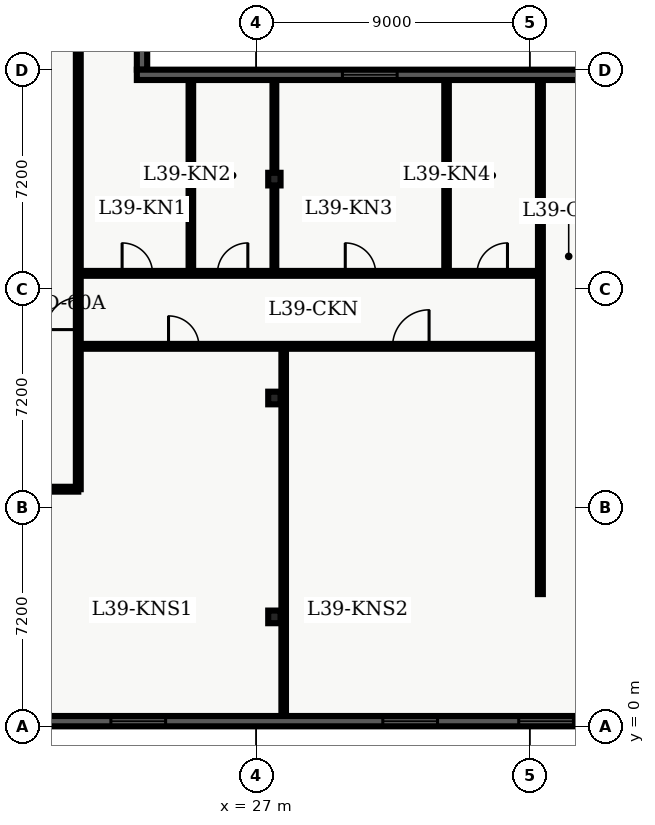
"""IFC4 building model, lengths in metres.
Left out: names, types, materials, properties, quantities, classifications, styles, units other than length and angle.
Written with IfcOpenShell. Run it as: python <this file> out.ifc"""

import sys

from ifc_helpers import new_model, entity, si_unit, converted_unit, direction, frame, origin_with_axes, origin_2d_with_axis, place, context, subcontext, project, spatial, polyline, rectangle, i_section, outline, extrude, element, fill, save


model = new_model("IFC4")
c1 = context("Model", 3, precision=1e-05, world=origin_with_axes(), true_north=direction((0.0, 1.0)))
c2 = subcontext(c1, "Body", "Model", "MODEL_VIEW")
j1 = project(units=[si_unit("LENGTHUNIT", "METRE"), converted_unit("PLANEANGLEUNIT", "DEGREE", entity("IfcPlaneAngleMeasure", 0.017), si_unit("PLANEANGLEUNIT", "RADIAN"), dimensions=[0, 0, 0, 0, 0, 0, 0])], contexts=[c1])
p1 = place(None, origin_with_axes())
s1 = spatial("IfcSite", under=j1, at=p1, CompositionType="ELEMENT")
p2 = place(p1, origin_with_axes())
s2 = spatial("IfcBuilding", under=s1, at=p2, CompositionType="ELEMENT")
p3 = place(p2, frame((0.0, 0.0, 160.2), z_axis=(0.0, 0.0, 1.0), x_axis=(1.0, 0.0, 0.0)))
s3 = spatial("IfcBuildingStorey", under=s2, at=p3, CompositionType="ELEMENT", Elevation=160.2)
for number, where, z_axis, x_axis in (
    (1, (27.6, 3.6, 0.0), (0.0, 0.0, 1.0), (1.0, 0.0, 0.0)),
    (2, (27.6, 10.8, 0.0), (0.0, 0.0, 1.0), (1.0, 0.0, 0.0)),
    (3, (27.6, 18.0, 0.0), (0.0, 0.0, 1.0), (1.0, 0.0, 0.0)),
):
    element("IfcColumn", number, at=place(p3, frame(where, z_axis=z_axis, x_axis=x_axis)), inside=s3, PredefinedType="COLUMN", context=c2, shape_type="SweptSolid", body=[
        extrude(i_section(OverallWidth=0.406, OverallDepth=0.416, WebThickness=0.03, FlangeThickness=0.048, FilletRadius=0.022, at=origin_2d_with_axis()), origin_with_axes(), (0.0, 0.0, 1.0), 3.9),
    ])
p4 = place(p3, frame((2.6, 7.8, 0.0), z_axis=(0.0, 0.0, 1.0), x_axis=(1.0, 0.0, 0.0)))
e4 = element("IfcWall", 4, at=p4, inside=s3, PredefinedType="PARTITIONING", context=c2, shape_type="SweptSolid", body=[
    extrude(outline(polyline([(0.0, -0.08), (18.55, -0.08), (18.55, 0.08), (0.0, 0.08), (0.0, -0.08)])), origin_with_axes(), (0.0, 0.0, 1.0), 2.7),
])
p5 = place(p4, frame((2.551, 0.0, 0.0), z_axis=(0.0, 0.0, 1.0), x_axis=(1.0, 0.0, 0.0)))
e5 = element("IfcOpeningElement", 5, at=p5, cuts=e4, PredefinedType="OPENING", context=c2, shape_type="SweptSolid", body=[
    extrude(rectangle(XDim=1.0, YDim=0.18, at=origin_2d_with_axis()), origin_with_axes(), (0.0, 0.0, 1.0), 2.15),
])
p6 = place(p4, frame((8.065, 0.0, 0.0), z_axis=(0.0, 0.0, 1.0), x_axis=(1.0, 0.0, 0.0)))
e6 = element("IfcOpeningElement", 6, at=p6, cuts=e4, PredefinedType="OPENING", context=c2, shape_type="SweptSolid", body=[
    extrude(rectangle(XDim=1.0, YDim=0.18, at=origin_2d_with_axis()), origin_with_axes(), (0.0, 0.0, 1.0), 2.15),
])
p7 = place(p4, frame((14.758, 0.0, 0.0), z_axis=(0.0, 0.0, 1.0), x_axis=(1.0, 0.0, 0.0)))
e7 = element("IfcOpeningElement", 7, at=p7, cuts=e4, PredefinedType="OPENING", context=c2, shape_type="SweptSolid", body=[
    extrude(rectangle(XDim=1.0, YDim=0.18, at=origin_2d_with_axis()), origin_with_axes(), (0.0, 0.0, 1.0), 2.15),
])
p8 = place(p3, frame((21.15, 7.8, 0.0), z_axis=(0.0, 0.0, 1.0), x_axis=(0.0, 1.0, 0.0)))
e8 = element("IfcWall", 8, at=p8, inside=s3, PredefinedType="PARTITIONING", context=c2, shape_type="SweptSolid", body=[
    extrude(outline(polyline([(0.0, -0.08), (32.7, -0.08), (32.7, 0.08), (0.0, 0.08), (0.0, -0.08)])), origin_with_axes(), (0.0, 0.0, 1.0), 2.7),
])
p9 = place(p8, frame((5.775, 0.0, 0.0), z_axis=(0.0, 0.0, 1.0), x_axis=(1.0, 0.0, 0.0)))
e9 = element("IfcOpeningElement", 9, at=p9, cuts=e8, PredefinedType="OPENING", context=c2, shape_type="SweptSolid", body=[
    extrude(rectangle(XDim=1.05, YDim=0.18, at=origin_2d_with_axis()), origin_with_axes(), (0.0, 0.0, 1.0), 2.15),
])
p10 = place(p3, frame((21.15, 12.5, 0.0), z_axis=(0.0, 0.0, 1.0), x_axis=(1.0, 0.0, 0.0)))
e10 = element("IfcWall", 10, at=p10, inside=s3, PredefinedType="PARTITIONING", context=c2, shape_type="SweptSolid", body=[
    extrude(outline(polyline([(0.0, -0.08), (15.2, -0.08), (15.2, 0.08), (0.0, 0.08), (0.0, -0.08)])), origin_with_axes(), (0.0, 0.0, 1.0), 2.7),
])
p11 = place(p10, frame((3.468, 0.0, 0.0), z_axis=(0.0, 0.0, 1.0), x_axis=(1.0, 0.0, 0.0)))
e11 = element("IfcOpeningElement", 11, at=p11, cuts=e10, PredefinedType="OPENING", context=c2, shape_type="SweptSolid", body=[
    extrude(rectangle(XDim=1.0, YDim=0.18, at=origin_2d_with_axis()), origin_with_axes(), (0.0, 0.0, 1.0), 2.15),
])
p12 = place(p10, frame((10.938, 0.0, 0.0), z_axis=(0.0, 0.0, 1.0), x_axis=(1.0, 0.0, 0.0)))
e12 = element("IfcOpeningElement", 12, at=p12, cuts=e10, PredefinedType="OPENING", context=c2, shape_type="SweptSolid", body=[
    extrude(rectangle(XDim=1.2, YDim=0.18, at=origin_2d_with_axis()), origin_with_axes(), (0.0, 0.0, 1.0), 2.2),
])
p13 = place(p3, frame((21.15, 14.9, 0.0), z_axis=(0.0, 0.0, 1.0), x_axis=(1.0, 0.0, 0.0)))
e13 = element("IfcWall", 13, at=p13, inside=s3, PredefinedType="PARTITIONING", context=c2, shape_type="SweptSolid", body=[
    extrude(outline(polyline([(0.0, -0.08), (15.2, -0.08), (15.2, 0.08), (0.0, 0.08), (0.0, -0.08)])), origin_with_axes(), (0.0, 0.0, 1.0), 2.7),
])
p14 = place(p13, frame((1.942, 0.0, 0.0), z_axis=(0.0, 0.0, 1.0), x_axis=(1.0, 0.0, 0.0)))
e14 = element("IfcOpeningElement", 14, at=p14, cuts=e13, PredefinedType="OPENING", context=c2, shape_type="SweptSolid", body=[
    extrude(rectangle(XDim=1.0, YDim=0.18, at=origin_2d_with_axis()), origin_with_axes(), (0.0, 0.0, 1.0), 2.15),
])
p15 = place(p13, frame((5.077, 0.0, 0.0), z_axis=(0.0, 0.0, 1.0), x_axis=(1.0, 0.0, 0.0)))
e15 = element("IfcOpeningElement", 15, at=p15, cuts=e13, PredefinedType="OPENING", context=c2, shape_type="SweptSolid", body=[
    extrude(rectangle(XDim=1.0, YDim=0.18, at=origin_2d_with_axis()), origin_with_axes(), (0.0, 0.0, 1.0), 2.15),
])
p16 = place(p13, frame((9.281, 0.0, 0.0), z_axis=(0.0, 0.0, 1.0), x_axis=(1.0, 0.0, 0.0)))
e16 = element("IfcOpeningElement", 16, at=p16, cuts=e13, PredefinedType="OPENING", context=c2, shape_type="SweptSolid", body=[
    extrude(rectangle(XDim=1.0, YDim=0.18, at=origin_2d_with_axis()), origin_with_axes(), (0.0, 0.0, 1.0), 2.15),
])
p17 = place(p13, frame((13.617, 0.0, 0.0), z_axis=(0.0, 0.0, 1.0), x_axis=(1.0, 0.0, 0.0)))
e17 = element("IfcOpeningElement", 17, at=p17, cuts=e13, PredefinedType="OPENING", context=c2, shape_type="SweptSolid", body=[
    extrude(rectangle(XDim=1.0, YDim=0.18, at=origin_2d_with_axis()), origin_with_axes(), (0.0, 0.0, 1.0), 2.15),
])
p18 = place(p3, frame((36.35, 4.35, 0.0), z_axis=(0.0, 0.0, 1.0), x_axis=(0.0, 1.0, 0.0)))
e18 = element("IfcWall", 18, at=p18, inside=s3, PredefinedType="PARTITIONING", context=c2, shape_type="SweptSolid", body=[
    extrude(outline(polyline([(0.0, -0.08), (16.95, -0.08), (16.95, 0.08), (0.0, 0.08), (0.0, -0.08)])), origin_with_axes(), (0.0, 0.0, 1.0), 2.7),
])
p19 = place(p3, frame((27.906, 0.335, 0.0), z_axis=(0.0, 0.0, 1.0), x_axis=(0.0, 1.0, 0.0)))
e19 = element("IfcWall", 19, at=p19, inside=s3, PredefinedType="PARTITIONING", context=c2, shape_type="SweptSolid", body=[
    extrude(outline(polyline([(0.0, -0.075), (12.045, -0.075), (12.045, 0.075), (0.0, 0.075), (0.0, -0.075)])), origin_with_axes(), (0.0, 0.0, 1.0), 2.7),
])
p20 = place(p3, frame((24.853, 15.02, 0.0), z_axis=(0.0, 0.0, 1.0), x_axis=(0.0, 1.0, 0.0)))
e20 = element("IfcWall", 20, at=p20, inside=s3, PredefinedType="PARTITIONING", context=c2, shape_type="SweptSolid", body=[
    extrude(outline(polyline([(0.0, -0.075), (6.245, -0.075), (6.245, 0.075), (0.0, 0.075), (0.0, -0.075)])), origin_with_axes(), (0.0, 0.0, 1.0), 2.7),
])
p21 = place(p3, frame((27.6, 15.02, 0.0), z_axis=(0.0, 0.0, 1.0), x_axis=(0.0, 1.0, 0.0)))
e21 = element("IfcWall", 21, at=p21, inside=s3, PredefinedType="PARTITIONING", context=c2, shape_type="SweptSolid", body=[
    extrude(outline(polyline([(0.0, -0.062), (6.245, -0.062), (6.245, 0.062), (0.0, 0.062), (0.0, -0.062)])), origin_with_axes(), (0.0, 0.0, 1.0), 2.7),
])
p22 = place(p3, frame((33.263, 15.02, 0.0), z_axis=(0.0, 0.0, 1.0), x_axis=(0.0, 1.0, 0.0)))
e22 = element("IfcWall", 22, at=p22, inside=s3, PredefinedType="PARTITIONING", context=c2, shape_type="SweptSolid", body=[
    extrude(outline(polyline([(0.0, -0.075), (6.245, -0.075), (6.245, 0.075), (0.0, 0.075), (0.0, -0.075)])), origin_with_axes(), (0.0, 0.0, 1.0), 2.7),
])
p23 = place(p3, frame((57.26, 0.17, 0.0), z_axis=(0.0, 0.0, 1.0), x_axis=(-1.0, 0.0, 0.0)))
e23 = element("IfcWall", 23, at=p23, inside=s3, PredefinedType="SOLIDWALL", context=c2, shape_type="SweptSolid", body=[
    extrude(outline(polyline([(0.0, -0.17), (54.86, -0.17), (54.86, 0.17), (0.0, 0.17), (0.0, -0.17)])), origin_with_axes(), (0.0, 0.0, 1.0), 3.66),
])
p24 = place(p23, frame((2.836, 0.0, 0.45), z_axis=(0.0, 0.0, 1.0), x_axis=(1.0, 0.0, 0.0)))
e24 = element("IfcOpeningElement", 24, at=p24, cuts=e23, PredefinedType="OPENING", context=c2, shape_type="SweptSolid", body=[
    extrude(rectangle(XDim=1.8, YDim=0.36, at=origin_2d_with_axis()), origin_with_axes(), (0.0, 0.0, 1.0), 2.1),
])
p25 = place(p23, frame((7.307, 0.0, 0.45), z_axis=(0.0, 0.0, 1.0), x_axis=(1.0, 0.0, 0.0)))
e25 = element("IfcOpeningElement", 25, at=p25, cuts=e23, PredefinedType="OPENING", context=c2, shape_type="SweptSolid", body=[
    extrude(rectangle(XDim=1.8, YDim=0.36, at=origin_2d_with_axis()), origin_with_axes(), (0.0, 0.0, 1.0), 2.1),
])
p26 = place(p23, frame((11.779, 0.0, 0.45), z_axis=(0.0, 0.0, 1.0), x_axis=(1.0, 0.0, 0.0)))
e26 = element("IfcOpeningElement", 26, at=p26, cuts=e23, PredefinedType="OPENING", context=c2, shape_type="SweptSolid", body=[
    extrude(rectangle(XDim=1.8, YDim=0.36, at=origin_2d_with_axis()), origin_with_axes(), (0.0, 0.0, 1.0), 2.1),
])
p27 = place(p23, frame((16.251, 0.0, 0.45), z_axis=(0.0, 0.0, 1.0), x_axis=(1.0, 0.0, 0.0)))
e27 = element("IfcOpeningElement", 27, at=p27, cuts=e23, PredefinedType="OPENING", context=c2, shape_type="SweptSolid", body=[
    extrude(rectangle(XDim=1.8, YDim=0.36, at=origin_2d_with_axis()), origin_with_axes(), (0.0, 0.0, 1.0), 2.1),
])
p28 = place(p23, frame((20.723, 0.0, 0.45), z_axis=(0.0, 0.0, 1.0), x_axis=(1.0, 0.0, 0.0)))
e28 = element("IfcOpeningElement", 28, at=p28, cuts=e23, PredefinedType="OPENING", context=c2, shape_type="SweptSolid", body=[
    extrude(rectangle(XDim=1.8, YDim=0.36, at=origin_2d_with_axis()), origin_with_axes(), (0.0, 0.0, 1.0), 2.1),
])
p29 = place(p23, frame((25.194, 0.0, 0.45), z_axis=(0.0, 0.0, 1.0), x_axis=(1.0, 0.0, 0.0)))
e29 = element("IfcOpeningElement", 29, at=p29, cuts=e23, PredefinedType="OPENING", context=c2, shape_type="SweptSolid", body=[
    extrude(rectangle(XDim=1.8, YDim=0.36, at=origin_2d_with_axis()), origin_with_axes(), (0.0, 0.0, 1.0), 2.1),
])
p30 = place(p23, frame((34.138, 0.0, 0.45), z_axis=(0.0, 0.0, 1.0), x_axis=(1.0, 0.0, 0.0)))
e30 = element("IfcOpeningElement", 30, at=p30, cuts=e23, PredefinedType="OPENING", context=c2, shape_type="SweptSolid", body=[
    extrude(rectangle(XDim=1.8, YDim=0.36, at=origin_2d_with_axis()), origin_with_axes(), (0.0, 0.0, 1.0), 2.1),
])
p31 = place(p23, frame((38.609, 0.0, 0.45), z_axis=(0.0, 0.0, 1.0), x_axis=(1.0, 0.0, 0.0)))
e31 = element("IfcOpeningElement", 31, at=p31, cuts=e23, PredefinedType="OPENING", context=c2, shape_type="SweptSolid", body=[
    extrude(rectangle(XDim=1.8, YDim=0.36, at=origin_2d_with_axis()), origin_with_axes(), (0.0, 0.0, 1.0), 2.1),
])
p32 = place(p23, frame((42.231, 0.0, 0.45), z_axis=(0.0, 0.0, 1.0), x_axis=(1.0, 0.0, 0.0)))
e32 = element("IfcOpeningElement", 32, at=p32, cuts=e23, PredefinedType="OPENING", context=c2, shape_type="SweptSolid", body=[
    extrude(rectangle(XDim=1.8, YDim=0.36, at=origin_2d_with_axis()), origin_with_axes(), (0.0, 0.0, 1.0), 2.1),
])
p33 = place(p23, frame((47.553, 0.0, 0.45), z_axis=(0.0, 0.0, 1.0), x_axis=(1.0, 0.0, 0.0)))
e33 = element("IfcOpeningElement", 33, at=p33, cuts=e23, PredefinedType="OPENING", context=c2, shape_type="SweptSolid", body=[
    extrude(rectangle(XDim=1.8, YDim=0.36, at=origin_2d_with_axis()), origin_with_axes(), (0.0, 0.0, 1.0), 2.1),
])
p34 = place(p23, frame((52.024, 0.0, 0.45), z_axis=(0.0, 0.0, 1.0), x_axis=(1.0, 0.0, 0.0)))
e34 = element("IfcOpeningElement", 34, at=p34, cuts=e23, PredefinedType="OPENING", context=c2, shape_type="SweptSolid", body=[
    extrude(rectangle(XDim=1.8, YDim=0.36, at=origin_2d_with_axis()), origin_with_axes(), (0.0, 0.0, 1.0), 2.1),
])
p35 = place(p3, frame((23.246, 45.86, 0.0), z_axis=(0.0, 0.0, 1.0), x_axis=(0.0, -1.0, 0.0)))
e35 = element("IfcWall", 35, at=p35, inside=s3, PredefinedType="SOLIDWALL", context=c2, shape_type="SweptSolid", body=[
    extrude(outline(polyline([(0.0, -0.17), (24.26, -0.17), (24.26, 0.17), (0.0, 0.17), (0.0, -0.17)])), origin_with_axes(), (0.0, 0.0, 1.0), 3.66),
])
p36 = place(p35, frame((2.906, 0.0, 0.45), z_axis=(0.0, 0.0, 1.0), x_axis=(1.0, 0.0, 0.0)))
e36 = element("IfcOpeningElement", 36, at=p36, cuts=e35, PredefinedType="OPENING", context=c2, shape_type="SweptSolid", body=[
    extrude(rectangle(XDim=1.6, YDim=0.36, at=origin_2d_with_axis()), origin_with_axes(), (0.0, 0.0, 1.0), 2.2),
])
p37 = place(p35, frame((7.518, 0.0, 0.45), z_axis=(0.0, 0.0, 1.0), x_axis=(1.0, 0.0, 0.0)))
e37 = element("IfcOpeningElement", 37, at=p37, cuts=e35, PredefinedType="OPENING", context=c2, shape_type="SweptSolid", body=[
    extrude(rectangle(XDim=1.6, YDim=0.36, at=origin_2d_with_axis()), origin_with_axes(), (0.0, 0.0, 1.0), 2.2),
])
p38 = place(p35, frame((12.13, 0.0, 0.45), z_axis=(0.0, 0.0, 1.0), x_axis=(1.0, 0.0, 0.0)))
e38 = element("IfcOpeningElement", 38, at=p38, cuts=e35, PredefinedType="OPENING", context=c2, shape_type="SweptSolid", body=[
    extrude(rectangle(XDim=1.6, YDim=0.36, at=origin_2d_with_axis()), origin_with_axes(), (0.0, 0.0, 1.0), 2.2),
])
p39 = place(p35, frame((16.742, 0.0, 0.45), z_axis=(0.0, 0.0, 1.0), x_axis=(1.0, 0.0, 0.0)))
e39 = element("IfcOpeningElement", 39, at=p39, cuts=e35, PredefinedType="OPENING", context=c2, shape_type="SweptSolid", body=[
    extrude(rectangle(XDim=1.6, YDim=0.36, at=origin_2d_with_axis()), origin_with_axes(), (0.0, 0.0, 1.0), 2.2),
])
p40 = place(p35, frame((21.354, 0.0, 0.45), z_axis=(0.0, 0.0, 1.0), x_axis=(1.0, 0.0, 0.0)))
e40 = element("IfcOpeningElement", 40, at=p40, cuts=e35, PredefinedType="OPENING", context=c2, shape_type="SweptSolid", body=[
    extrude(rectangle(XDim=1.6, YDim=0.36, at=origin_2d_with_axis()), origin_with_axes(), (0.0, 0.0, 1.0), 2.2),
])
p41 = place(p3, frame((23.076, 21.43, 0.0), z_axis=(0.0, 0.0, 1.0), x_axis=(1.0, 0.0, 0.0)))
e41 = element("IfcWall", 41, at=p41, inside=s3, PredefinedType="SOLIDWALL", context=c2, shape_type="SweptSolid", body=[
    extrude(outline(polyline([(0.0, -0.17), (15.324, -0.17), (15.324, 0.17), (0.0, 0.17), (0.0, -0.17)])), origin_with_axes(), (0.0, 0.0, 1.0), 3.66),
])
p42 = place(p41, frame((7.662, 0.0, 0.45), z_axis=(0.0, 0.0, 1.0), x_axis=(1.0, 0.0, 0.0)))
e42 = element("IfcOpeningElement", 42, at=p42, cuts=e41, PredefinedType="OPENING", context=c2, shape_type="SweptSolid", body=[
    extrude(rectangle(XDim=1.8, YDim=0.36, at=origin_2d_with_axis()), origin_with_axes(), (0.0, 0.0, 1.0), 2.1),
])
p43 = place(p8, frame((5.775, 0.0, 0.0), z_axis=(0.0, 0.0, 1.0), x_axis=(1.0, 0.0, 0.0)))
e43 = element("IfcDoor", 43, at=p43, inside=s3, OperationType="SINGLE_SWING_LEFT", PredefinedType="DOOR", context=c2, shape_type="SweptSolid", body=[
    extrude(rectangle(XDim=1.05, YDim=0.09, at=origin_2d_with_axis()), origin_with_axes(), (0.0, 0.0, 1.0), 2.15),
])
fill(e9, e43)
p44 = place(p10, frame((3.468, 0.0, 0.0), z_axis=(0.0, 0.0, 1.0), x_axis=(1.0, 0.0, 0.0)))
e44 = element("IfcDoor", 44, at=p44, inside=s3, OperationType="SINGLE_SWING_LEFT", PredefinedType="DOOR", context=c2, shape_type="SweptSolid", body=[
    extrude(rectangle(XDim=1.0, YDim=0.09, at=origin_2d_with_axis()), origin_with_axes(), (0.0, 0.0, 1.0), 2.15),
])
fill(e11, e44)
p45 = place(p10, frame((10.938, 0.0, 0.0), z_axis=(0.0, 0.0, 1.0), x_axis=(1.0, 0.0, 0.0)))
e45 = element("IfcDoor", 45, at=p45, inside=s3, OperationType="SINGLE_SWING_RIGHT", PredefinedType="DOOR", context=c2, shape_type="SweptSolid", body=[
    extrude(rectangle(XDim=1.2, YDim=0.09, at=origin_2d_with_axis()), origin_with_axes(), (0.0, 0.0, 1.0), 2.2),
])
fill(e12, e45)
p46 = place(p13, frame((1.942, 0.0, 0.0), z_axis=(0.0, 0.0, 1.0), x_axis=(1.0, 0.0, 0.0)))
e46 = element("IfcDoor", 46, at=p46, inside=s3, OperationType="SINGLE_SWING_LEFT", PredefinedType="DOOR", context=c2, shape_type="SweptSolid", body=[
    extrude(rectangle(XDim=1.0, YDim=0.09, at=origin_2d_with_axis()), origin_with_axes(), (0.0, 0.0, 1.0), 2.15),
])
fill(e14, e46)
p47 = place(p13, frame((5.077, 0.0, 0.0), z_axis=(0.0, 0.0, 1.0), x_axis=(1.0, 0.0, 0.0)))
e47 = element("IfcDoor", 47, at=p47, inside=s3, OperationType="SINGLE_SWING_RIGHT", PredefinedType="DOOR", context=c2, shape_type="SweptSolid", body=[
    extrude(rectangle(XDim=1.0, YDim=0.09, at=origin_2d_with_axis()), origin_with_axes(), (0.0, 0.0, 1.0), 2.15),
])
fill(e15, e47)
p48 = place(p13, frame((9.281, 0.0, 0.0), z_axis=(0.0, 0.0, 1.0), x_axis=(1.0, 0.0, 0.0)))
e48 = element("IfcDoor", 48, at=p48, inside=s3, OperationType="SINGLE_SWING_LEFT", PredefinedType="DOOR", context=c2, shape_type="SweptSolid", body=[
    extrude(rectangle(XDim=1.0, YDim=0.09, at=origin_2d_with_axis()), origin_with_axes(), (0.0, 0.0, 1.0), 2.15),
])
fill(e16, e48)
p49 = place(p13, frame((13.617, 0.0, 0.0), z_axis=(0.0, 0.0, 1.0), x_axis=(1.0, 0.0, 0.0)))
e49 = element("IfcDoor", 49, at=p49, inside=s3, OperationType="SINGLE_SWING_RIGHT", PredefinedType="DOOR", context=c2, shape_type="SweptSolid", body=[
    extrude(rectangle(XDim=1.0, YDim=0.09, at=origin_2d_with_axis()), origin_with_axes(), (0.0, 0.0, 1.0), 2.15),
])
fill(e17, e49)
p50 = place(p23, frame((20.723, 0.0, 0.45), z_axis=(0.0, 0.0, 1.0), x_axis=(1.0, 0.0, 0.0)))
e50 = element("IfcWindow", 50, at=p50, inside=s3, PredefinedType="WINDOW", context=c2, shape_type="SweptSolid", body=[
    extrude(rectangle(XDim=1.8, YDim=0.09, at=origin_2d_with_axis()), origin_with_axes(), (0.0, 0.0, 1.0), 2.1),
])
fill(e28, e50)
p51 = place(p23, frame((25.194, 0.0, 0.45), z_axis=(0.0, 0.0, 1.0), x_axis=(1.0, 0.0, 0.0)))
e51 = element("IfcWindow", 51, at=p51, inside=s3, PredefinedType="WINDOW", context=c2, shape_type="SweptSolid", body=[
    extrude(rectangle(XDim=1.8, YDim=0.09, at=origin_2d_with_axis()), origin_with_axes(), (0.0, 0.0, 1.0), 2.1),
])
fill(e29, e51)
p52 = place(p23, frame((34.138, 0.0, 0.45), z_axis=(0.0, 0.0, 1.0), x_axis=(1.0, 0.0, 0.0)))
e52 = element("IfcWindow", 52, at=p52, inside=s3, PredefinedType="WINDOW", context=c2, shape_type="SweptSolid", body=[
    extrude(rectangle(XDim=1.8, YDim=0.09, at=origin_2d_with_axis()), origin_with_axes(), (0.0, 0.0, 1.0), 2.1),
])
fill(e30, e52)
p53 = place(p41, frame((7.662, 0.0, 0.45), z_axis=(0.0, 0.0, 1.0), x_axis=(1.0, 0.0, 0.0)))
e53 = element("IfcWindow", 53, at=p53, inside=s3, PredefinedType="WINDOW", context=c2, shape_type="SweptSolid", body=[
    extrude(rectangle(XDim=1.8, YDim=0.09, at=origin_2d_with_axis()), origin_with_axes(), (0.0, 0.0, 1.0), 2.1),
])
fill(e42, e53)
save(model, sys.argv[1])
